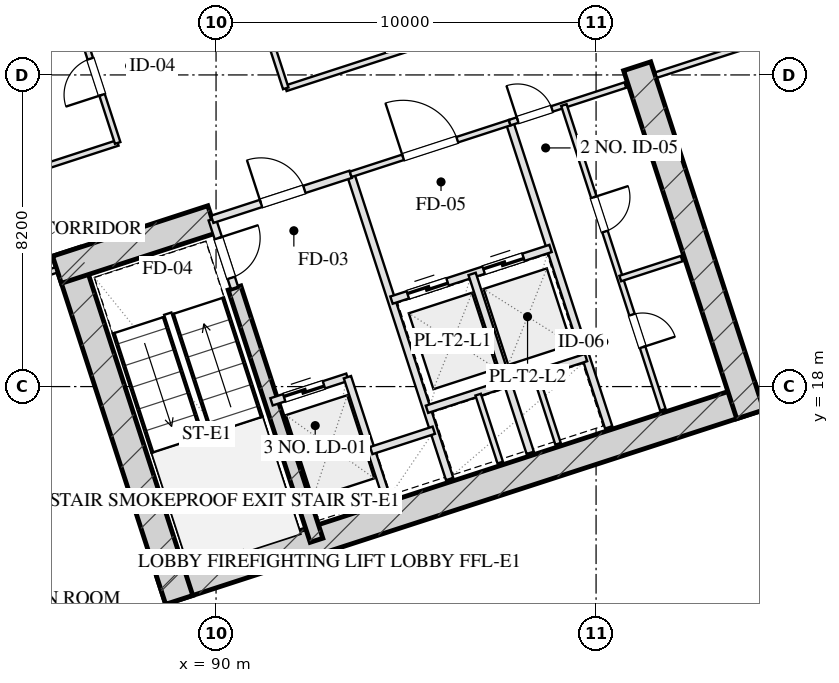
"""IFC4 building model, lengths in metres.
Left out: names, types, materials, properties, quantities, classifications, styles, units other than length and angle.
Written with IfcOpenShell. Run it as: python <this file> out.ifc"""

import sys

from ifc_helpers import new_model, si_unit, direction, frame, frame_2d, origin, place, context, subcontext, project, spatial, rectangle, extrude, element, fill, save


model = new_model("IFC4")
c1 = context("Model", 3, precision=1e-05, world=origin(), true_north=direction((0.0, 1.0)))
c2 = subcontext(c1, "Body", "Model", "MODEL_VIEW")
j1 = project(units=[si_unit("LENGTHUNIT", "METRE"), si_unit("PLANEANGLEUNIT", "RADIAN")], contexts=[c1])
p1 = place(None, origin())
s1 = spatial("IfcSite", under=j1, at=p1, CompositionType="ELEMENT")
p2 = place(p1, origin())
s2 = spatial("IfcBuilding", under=s1, at=p2, CompositionType="ELEMENT")
p3 = place(p2, frame((0.0, 0.0, 30.0)))
s3 = spatial("IfcBuildingStorey", under=s2, at=p3, CompositionType="ELEMENT", Elevation=30.0)
p4 = place(p3, frame((88.559, 12.629, 0.0), z_axis=(0.0, 0.0, 1.0), x_axis=(0.951056072937, 0.309018358888, 0.0)))
e1 = element("IfcWall", 1, at=p4, inside=s3, PredefinedType="SHEAR", context=c2, shape_type="SweptSolid", body=[
    extrude(rectangle(XDim=16.55, YDim=0.75, at=frame_2d((8.275, 0.0))), origin(), (0.0, 0.0, 1.0), 4.0),
])
p5 = place(p3, frame((86.055, 21.546, 0.0), z_axis=(0.0, 0.0, 1.0), x_axis=(0.309023585745, -0.951054374604, 0.0)))
e2 = element("IfcWall", 2, at=p5, inside=s3, PredefinedType="SHEAR", context=c2, shape_type="SweptSolid", body=[
    extrude(rectangle(XDim=9.63, YDim=0.75, at=frame_2d((4.815, 0.0))), origin(), (0.0, 0.0, 1.0), 4.0),
])
p6 = place(p3, frame((101.082, 26.429, 0.0), z_axis=(0.0, 0.0, 1.0), x_axis=(0.309016134813, -0.951056795583, 0.0)))
e3 = element("IfcWall", 3, at=p6, inside=s3, PredefinedType="SHEAR", context=c2, shape_type="SweptSolid", body=[
    extrude(rectangle(XDim=9.63, YDim=0.75, at=frame_2d((4.815, 0.0))), origin(), (0.0, 0.0, 1.0), 4.0),
])
p7 = place(p3, frame((90.486, 20.594, 0.0), z_axis=(0.0, 0.0, 1.0), x_axis=(0.309020428229, -0.951055400562, 0.0)))
e4 = element("IfcWall", 4, at=p7, inside=s3, PredefinedType="SHEAR", context=c2, shape_type="SweptSolid", body=[
    extrude(rectangle(XDim=6.98, YDim=0.35, at=frame_2d((3.49, 0.0))), origin(), (0.0, 0.0, 1.0), 4.0),
])
p8 = place(p3, frame((85.814, 21.074, 0.0), z_axis=(0.0, 0.0, 1.0), x_axis=(0.95106580992, 0.308988390074, 0.0)))
e5 = element("IfcWall", 5, at=p8, inside=s3, PredefinedType="SHEAR", context=c2, shape_type="SweptSolid", body=[
    extrude(rectangle(XDim=4.295, YDim=0.75, at=frame_2d((2.147, 0.0))), origin(), (0.0, 0.0, 1.0), 4.0),
])
p9 = place(p3, frame((100.345, 63.648, 0.0), z_axis=(0.0, 0.0, 1.0), x_axis=(0.309014526607, -0.951057318118, 0.0)))
e6 = element("IfcWall", 6, at=p9, inside=s3, PredefinedType="SOLIDWALL", context=c2, shape_type="SweptSolid", body=[
    extrude(rectangle(XDim=50.0, YDim=0.4, at=frame_2d((25.0, 0.0))), origin(), (0.0, 0.0, 1.0), 3.16),
])
p10 = place(p9, frame((30.15, 0.0, 0.75)))
e7 = element("IfcOpeningElement", 7, at=p10, cuts=e6, PredefinedType="OPENING", context=c2, shape_type="SweptSolid", body=[
    extrude(rectangle(XDim=2.5, YDim=1.75, at=frame_2d((1.25, 0.875))), frame((0.0, 0.21, 0.0), z_axis=(0.0, -1.0, 0.0), x_axis=(1.0, 0.0, 0.0)), (0.0, 0.0, 1.0), 0.42),
])
p11 = place(p9, frame((21.15, 0.0, 0.75)))
e8 = element("IfcOpeningElement", 8, at=p11, cuts=e6, PredefinedType="OPENING", context=c2, shape_type="SweptSolid", body=[
    extrude(rectangle(XDim=2.5, YDim=1.75, at=frame_2d((1.25, 0.875))), frame((0.0, 0.21, 0.0), z_axis=(0.0, -1.0, 0.0), x_axis=(1.0, 0.0, 0.0)), (0.0, 0.0, 1.0), 0.42),
])
p12 = place(p3, frame((113.998, 12.567, 0.0), z_axis=(0.0, 0.0, 1.0), x_axis=(-0.951055939317, -0.309018770125, 0.0)))
e9 = element("IfcWall", 9, at=p12, inside=s3, PredefinedType="SOLIDWALL", context=c2, shape_type="SweptSolid", body=[
    extrude(rectangle(XDim=32.4, YDim=0.4, at=frame_2d((16.2, 0.0))), origin(), (0.0, 0.0, 1.0), 3.16),
])
p13 = place(p3, frame((89.899, 22.401, 0.0), z_axis=(0.0, 0.0, 1.0), x_axis=(0.308932062672, -0.951084108086, 0.0)))
e10 = element("IfcWall", 10, at=p13, inside=s3, PredefinedType="PARTITIONING", context=c2, shape_type="SweptSolid", body=[
    extrude(rectangle(XDim=1.9, YDim=0.2, at=frame_2d((0.95, 0.0))), origin(), (0.0, 0.0, 1.0), 3.725),
])
p14 = place(p13, frame((0.52, 0.0, 0.0)))
e11 = element("IfcOpeningElement", 11, at=p14, cuts=e10, PredefinedType="OPENING", context=c2, shape_type="SweptSolid", body=[
    extrude(rectangle(XDim=1.1, YDim=2.05, at=frame_2d((0.55, 1.025))), frame((0.0, 0.11, 0.0), z_axis=(0.0, -1.0, 0.0), x_axis=(1.0, 0.0, 0.0)), (0.0, 0.0, 1.0), 0.22),
])
p15 = place(p3, frame((93.542, 23.585, 0.0), z_axis=(0.0, 0.0, 1.0), x_axis=(0.309042196757, -0.951048327176, 0.0)))
e12 = element("IfcWall", 12, at=p15, inside=s3, PredefinedType="PARTITIONING", context=c2, shape_type="SweptSolid", body=[
    extrude(rectangle(XDim=8.43, YDim=0.2, at=frame_2d((4.215, 0.0))), origin(), (0.0, 0.0, 1.0), 3.725),
])
p16 = place(p3, frame((89.899, 22.401, 0.0), z_axis=(0.0, 0.0, 1.0), x_axis=(0.951046716504, 0.309047153403, 0.0)))
e13 = element("IfcWall", 13, at=p16, inside=s3, PredefinedType="PARTITIONING", context=c2, shape_type="SweptSolid", body=[
    extrude(rectangle(XDim=3.83, YDim=0.2, at=frame_2d((1.915, 0.0))), origin(), (0.0, 0.0, 1.0), 3.725),
])
p17 = place(p16, frame((1.35, 0.0, 0.0)))
e14 = element("IfcOpeningElement", 14, at=p17, cuts=e13, PredefinedType="OPENING", context=c2, shape_type="SweptSolid", body=[
    extrude(rectangle(XDim=1.2, YDim=2.05, at=frame_2d((0.6, 1.025))), frame((0.0, 0.11, 0.0), z_axis=(0.0, -1.0, 0.0), x_axis=(1.0, 0.0, 0.0)), (0.0, 0.0, 1.0), 0.22),
])
p18 = place(p3, frame((91.46, 17.598, 0.0), z_axis=(0.0, 0.0, 1.0), x_axis=(0.951062257173, 0.308999325213, 0.0)))
e15 = element("IfcWall", 15, at=p18, inside=s3, PredefinedType="PARTITIONING", context=c2, shape_type="SweptSolid", body=[
    extrude(rectangle(XDim=2.1, YDim=0.2, at=frame_2d((1.05, 0.0))), origin(), (0.0, 0.0, 1.0), 3.725),
])
p19 = place(p18, frame((0.35, 0.0, 0.0)))
e16 = element("IfcOpeningElement", 16, at=p19, cuts=e15, PredefinedType="OPENING", context=c2, shape_type="SweptSolid", body=[
    extrude(rectangle(XDim=1.1, YDim=2.05, at=frame_2d((0.55, 1.025))), frame((0.0, 0.11, 0.0), z_axis=(0.0, -1.0, 0.0), x_axis=(1.0, 0.0, 0.0)), (0.0, 0.0, 1.0), 0.22),
])
p20 = place(p3, frame((93.457, 18.247, 0.0), z_axis=(0.0, 0.0, 1.0), x_axis=(0.3089935693, -0.951064127245, 0.0)))
e17 = element("IfcWall", 17, at=p20, inside=s3, PredefinedType="PARTITIONING", context=c2, shape_type="SweptSolid", body=[
    extrude(rectangle(XDim=3.7, YDim=0.2, at=frame_2d((1.85, 0.0))), origin(), (0.0, 0.0, 1.0), 3.725),
])
p21 = place(p3, frame((94.084, 16.317, 0.0), z_axis=(0.0, 0.0, 1.0), x_axis=(0.951041328149, 0.309063734775, 0.0)))
e18 = element("IfcWall", 18, at=p21, inside=s3, PredefinedType="PARTITIONING", context=c2, shape_type="SweptSolid", body=[
    extrude(rectangle(XDim=1.73, YDim=0.2, at=frame_2d((0.865, 0.0))), origin(), (0.0, 0.0, 1.0), 3.725),
])
p22 = place(p3, frame((97.727, 24.944, 0.0), z_axis=(0.0, 0.0, 1.0), x_axis=(0.309016001439, -0.951056838919, 0.0)))
e19 = element("IfcWall", 19, at=p22, inside=s3, PredefinedType="PARTITIONING", context=c2, shape_type="SweptSolid", body=[
    extrude(rectangle(XDim=8.43, YDim=0.2, at=frame_2d((4.215, 0.0))), origin(), (0.0, 0.0, 1.0), 3.725),
])
p23 = place(p3, frame((93.542, 23.585, 0.0), z_axis=(0.0, 0.0, 1.0), x_axis=(0.951063829732, 0.308994485023, 0.0)))
e20 = element("IfcWall", 20, at=p23, inside=s3, PredefinedType="PARTITIONING", context=c2, shape_type="SweptSolid", body=[
    extrude(rectangle(XDim=4.4, YDim=0.15, at=frame_2d((2.2, 0.0))), origin(), (0.0, 0.0, 1.0), 3.725),
])
p24 = place(p23, frame((1.45, 0.0, 0.0)))
e21 = element("IfcOpeningElement", 21, at=p24, cuts=e20, PredefinedType="OPENING", context=c2, shape_type="SweptSolid", body=[
    extrude(rectangle(XDim=1.5, YDim=2.05, at=frame_2d((0.75, 1.025))), frame((0.0, 0.085, 0.0), z_axis=(0.0, -1.0, 0.0), x_axis=(1.0, 0.0, 0.0)), (0.0, 0.0, 1.0), 0.17),
])
p25 = place(p3, frame((94.617, 20.275, 0.0), z_axis=(0.0, 0.0, 1.0), x_axis=(0.951058531764, 0.30901079133, 0.0)))
e22 = element("IfcWall", 22, at=p25, inside=s3, PredefinedType="PARTITIONING", context=c2, shape_type="SweptSolid", body=[
    extrude(rectangle(XDim=4.4, YDim=0.2, at=frame_2d((2.2, 0.0))), origin(), (0.0, 0.0, 1.0), 3.725),
])
p26 = place(p25, frame((0.45, 0.0, 0.0)))
e23 = element("IfcOpeningElement", 23, at=p26, cuts=e22, PredefinedType="OPENING", context=c2, shape_type="SweptSolid", body=[
    extrude(rectangle(XDim=1.1, YDim=2.05, at=frame_2d((0.55, 1.025))), frame((0.0, 0.11, 0.0), z_axis=(0.0, -1.0, 0.0), x_axis=(1.0, 0.0, 0.0)), (0.0, 0.0, 1.0), 0.22),
])
p27 = place(p25, frame((2.55, 0.0, 0.0)))
e24 = element("IfcOpeningElement", 24, at=p27, cuts=e22, PredefinedType="OPENING", context=c2, shape_type="SweptSolid", body=[
    extrude(rectangle(XDim=1.1, YDim=2.05, at=frame_2d((0.55, 1.025))), frame((0.0, 0.11, 0.0), z_axis=(0.0, -1.0, 0.0), x_axis=(1.0, 0.0, 0.0)), (0.0, 0.0, 1.0), 0.22),
])
p28 = place(p3, frame((96.738, 20.964, 0.0), z_axis=(0.0, 0.0, 1.0), x_axis=(0.309042578481, -0.951048203135, 0.0)))
e25 = element("IfcWall", 25, at=p28, inside=s3, PredefinedType="PARTITIONING", context=c2, shape_type="SweptSolid", body=[
    extrude(rectangle(XDim=4.95, YDim=0.2, at=frame_2d((2.475, 0.0))), origin(), (0.0, 0.0, 1.0), 3.725),
])
p29 = place(p3, frame((95.551, 17.403, 0.0), z_axis=(0.0, 0.0, 1.0), x_axis=(0.951058531764, 0.30901079133, 0.0)))
e26 = element("IfcWall", 26, at=p29, inside=s3, PredefinedType="PARTITIONING", context=c2, shape_type="SweptSolid", body=[
    extrude(rectangle(XDim=4.4, YDim=0.2, at=frame_2d((2.2, 0.0))), origin(), (0.0, 0.0, 1.0), 3.725),
])
p30 = place(p3, frame((96.897, 17.788, 0.0), z_axis=(0.0, 0.0, 1.0), x_axis=(0.30897153969, -0.951071284217, 0.0)))
e27 = element("IfcWall", 27, at=p30, inside=s3, PredefinedType="PARTITIONING", context=c2, shape_type="SweptSolid", body=[
    extrude(rectangle(XDim=1.88, YDim=0.15, at=frame_2d((0.94, 0.0))), origin(), (0.0, 0.0, 1.0), 3.725),
])
p31 = place(p3, frame((98.419, 18.282, 0.0), z_axis=(0.0, 0.0, 1.0), x_axis=(0.308933380006, -0.951083680187, 0.0)))
e28 = element("IfcWall", 28, at=p31, inside=s3, PredefinedType="PARTITIONING", context=c2, shape_type="SweptSolid", body=[
    extrude(rectangle(XDim=1.88, YDim=0.15, at=frame_2d((0.94, 0.0))), origin(), (0.0, 0.0, 1.0), 3.725),
])
p32 = place(p3, frame((97.727, 24.944, 0.0), z_axis=(0.0, 0.0, 1.0), x_axis=(0.951036872128, 0.309077446369, 0.0)))
e29 = element("IfcWall", 29, at=p32, inside=s3, PredefinedType="PARTITIONING", context=c2, shape_type="SweptSolid", body=[
    extrude(rectangle(XDim=3.2, YDim=0.15, at=frame_2d((1.6, 0.0))), origin(), (0.0, 0.0, 1.0), 3.725),
])
p33 = place(p32, frame((0.22, 0.0, 0.0)))
e30 = element("IfcOpeningElement", 30, at=p33, cuts=e29, PredefinedType="OPENING", context=c2, shape_type="SweptSolid", body=[
    extrude(rectangle(XDim=0.95, YDim=2.05, at=frame_2d((0.475, 1.025))), frame((0.0, 0.085, 0.0), z_axis=(0.0, -1.0, 0.0), x_axis=(1.0, 0.0, 0.0)), (0.0, 0.0, 1.0), 0.17),
])
p34 = place(p3, frame((99.153, 25.408, 0.0), z_axis=(0.0, 0.0, 1.0), x_axis=(0.309016001439, -0.951056838919, 0.0)))
e31 = element("IfcWall", 31, at=p34, inside=s3, PredefinedType="PARTITIONING", context=c2, shape_type="SweptSolid", body=[
    extrude(rectangle(XDim=8.43, YDim=0.15, at=frame_2d((4.215, 0.0))), origin(), (0.0, 0.0, 1.0), 3.725),
])
p35 = place(p34, frame((2.55, 0.0, 0.0)))
e32 = element("IfcOpeningElement", 32, at=p35, cuts=e31, PredefinedType="OPENING", context=c2, shape_type="SweptSolid", body=[
    extrude(rectangle(XDim=0.95, YDim=2.05, at=frame_2d((0.475, 1.025))), frame((0.0, 0.085, 0.0), z_axis=(0.0, -1.0, 0.0), x_axis=(1.0, 0.0, 0.0)), (0.0, 0.0, 1.0), 0.17),
])
p36 = place(p34, frame((5.8, 0.0, 0.0)))
e33 = element("IfcOpeningElement", 33, at=p36, cuts=e31, PredefinedType="OPENING", context=c2, shape_type="SweptSolid", body=[
    extrude(rectangle(XDim=0.9, YDim=2.05, at=frame_2d((0.45, 1.025))), frame((0.0, 0.085, 0.0), z_axis=(0.0, -1.0, 0.0), x_axis=(1.0, 0.0, 0.0)), (0.0, 0.0, 1.0), 0.17),
])
p37 = place(p3, frame((100.636, 20.843, 0.0), z_axis=(0.0, 0.0, 1.0), x_axis=(0.951040401051, 0.309066587596, 0.0)))
e34 = element("IfcWall", 34, at=p37, inside=s3, PredefinedType="PARTITIONING", context=c2, shape_type="SweptSolid", body=[
    extrude(rectangle(XDim=1.7, YDim=0.15, at=frame_2d((0.85, 0.0))), origin(), (0.0, 0.0, 1.0), 3.725),
])
p38 = place(p3, frame((75.519, 17.729, 0.0), z_axis=(0.0, 0.0, 1.0), x_axis=(0.951056658866, 0.309016555588, 0.0)))
e35 = element("IfcWall", 35, at=p38, inside=s3, PredefinedType="PARTITIONING", context=c2, shape_type="SweptSolid", body=[
    extrude(rectangle(XDim=10.8, YDim=0.15, at=frame_2d((5.4, 0.0))), origin(), (0.0, 0.0, 1.0), 3.725),
])
p39 = place(p38, frame((4.536, 0.0, 0.0)))
e36 = element("IfcOpeningElement", 36, at=p39, cuts=e35, PredefinedType="OPENING", context=c2, shape_type="SweptSolid", body=[
    extrude(rectangle(XDim=1.0, YDim=2.05, at=frame_2d((0.5, 1.025))), frame((0.0, 0.085, 0.0), z_axis=(0.0, -1.0, 0.0), x_axis=(1.0, 0.0, 0.0)), (0.0, 0.0, 1.0), 0.17),
])
p40 = place(p3, frame((101.578, 26.196, 0.0), z_axis=(0.0, 0.0, 1.0), x_axis=(0.951059043131, 0.309009217467, 0.0)))
e37 = element("IfcWall", 37, at=p40, inside=s3, PredefinedType="PARTITIONING", context=c2, shape_type="SweptSolid", body=[
    extrude(rectangle(XDim=10.2, YDim=0.15, at=frame_2d((5.1, 0.0))), origin(), (0.0, 0.0, 1.0), 3.725),
])
p41 = place(p40, frame((4.284, 0.0, 0.0)))
e38 = element("IfcOpeningElement", 38, at=p41, cuts=e37, PredefinedType="OPENING", context=c2, shape_type="SweptSolid", body=[
    extrude(rectangle(XDim=1.0, YDim=2.05, at=frame_2d((0.5, 1.025))), frame((0.0, 0.085, 0.0), z_axis=(0.0, -1.0, 0.0), x_axis=(1.0, 0.0, 0.0)), (0.0, 0.0, 1.0), 0.17),
])
p42 = place(p3, frame((74.691, 20.278, 0.0), z_axis=(0.0, 0.0, 1.0), x_axis=(0.951052712421, 0.309028701251, 0.0)))
e39 = element("IfcWall", 39, at=p42, inside=s3, PredefinedType="PARTITIONING", context=c2, shape_type="SweptSolid", body=[
    extrude(rectangle(XDim=13.375, YDim=0.15, at=frame_2d((6.688, 0.0))), origin(), (0.0, 0.0, 1.0), 3.725),
])
p43 = place(p3, frame((91.834, 25.848, 0.0), z_axis=(0.0, 0.0, 1.0), x_axis=(0.951055605195, 0.309019798438, 0.0)))
e40 = element("IfcWall", 40, at=p43, inside=s3, PredefinedType="PARTITIONING", context=c2, shape_type="SweptSolid", body=[
    extrude(rectangle(XDim=19.575, YDim=0.15, at=frame_2d((9.788, 0.0))), origin(), (0.0, 0.0, 1.0), 3.725),
])
p44 = place(p3, frame((87.412, 24.411, 0.0), z_axis=(0.0, 0.0, 1.0), x_axis=(-0.309022042254, 0.951054876125, 0.0)))
e41 = element("IfcWall", 41, at=p44, inside=s3, PredefinedType="PARTITIONING", context=c2, shape_type="SweptSolid", body=[
    extrude(rectangle(XDim=16.64, YDim=0.15, at=frame_2d((8.32, 0.0))), origin(), (0.0, 0.0, 1.0), 3.725),
])
p45 = place(p44, frame((1.33, 0.0, 0.0)))
e42 = element("IfcOpeningElement", 42, at=p45, cuts=e41, PredefinedType="OPENING", context=c2, shape_type="SweptSolid", body=[
    extrude(rectangle(XDim=1.0, YDim=2.05, at=frame_2d((0.5, 1.025))), frame((0.0, 0.085, 0.0), z_axis=(0.0, -1.0, 0.0), x_axis=(1.0, 0.0, 0.0)), (0.0, 0.0, 1.0), 0.17),
])
p46 = place(p44, frame((5.83, 0.0, 0.0)))
e43 = element("IfcOpeningElement", 43, at=p46, cuts=e41, PredefinedType="OPENING", context=c2, shape_type="SweptSolid", body=[
    extrude(rectangle(XDim=1.0, YDim=2.05, at=frame_2d((0.5, 1.025))), frame((0.0, 0.085, 0.0), z_axis=(0.0, -1.0, 0.0), x_axis=(1.0, 0.0, 0.0)), (0.0, 0.0, 1.0), 0.17),
])
p47 = place(p44, frame((10.49, 0.0, 0.0)))
e44 = element("IfcOpeningElement", 44, at=p47, cuts=e41, PredefinedType="OPENING", context=c2, shape_type="SweptSolid", body=[
    extrude(rectangle(XDim=1.05, YDim=2.05, at=frame_2d((0.525, 1.025))), frame((0.0, 0.085, 0.0), z_axis=(0.0, -1.0, 0.0), x_axis=(1.0, 0.0, 0.0)), (0.0, 0.0, 1.0), 0.17),
])
p48 = place(p44, frame((14.31, 0.0, 0.0)))
e45 = element("IfcOpeningElement", 45, at=p48, cuts=e41, PredefinedType="OPENING", context=c2, shape_type="SweptSolid", body=[
    extrude(rectangle(XDim=1.0, YDim=2.05, at=frame_2d((0.5, 1.025))), frame((0.0, 0.085, 0.0), z_axis=(0.0, -1.0, 0.0), x_axis=(1.0, 0.0, 0.0)), (0.0, 0.0, 1.0), 0.17),
])
p49 = place(p3, frame((91.834, 25.848, 0.0), z_axis=(0.0, 0.0, 1.0), x_axis=(-0.30901773025, 0.951056277195, 0.0)))
e46 = element("IfcWall", 46, at=p49, inside=s3, PredefinedType="PARTITIONING", context=c2, shape_type="SweptSolid", body=[
    extrude(rectangle(XDim=16.64, YDim=0.15, at=frame_2d((8.32, 0.0))), origin(), (0.0, 0.0, 1.0), 3.725),
])
p50 = place(p49, frame((1.663, 0.0, 0.0)))
e47 = element("IfcOpeningElement", 47, at=p50, cuts=e46, PredefinedType="OPENING", context=c2, shape_type="SweptSolid", body=[
    extrude(rectangle(XDim=1.0, YDim=2.05, at=frame_2d((0.5, 1.025))), frame((0.0, 0.085, 0.0), z_axis=(0.0, -1.0, 0.0), x_axis=(1.0, 0.0, 0.0)), (0.0, 0.0, 1.0), 0.17),
])
p51 = place(p49, frame((6.156, 0.0, 0.0)))
e48 = element("IfcOpeningElement", 48, at=p51, cuts=e46, PredefinedType="OPENING", context=c2, shape_type="SweptSolid", body=[
    extrude(rectangle(XDim=1.0, YDim=2.05, at=frame_2d((0.5, 1.025))), frame((0.0, 0.085, 0.0), z_axis=(0.0, -1.0, 0.0), x_axis=(1.0, 0.0, 0.0)), (0.0, 0.0, 1.0), 0.17),
])
p52 = place(p49, frame((10.649, 0.0, 0.0)))
e49 = element("IfcOpeningElement", 49, at=p52, cuts=e46, PredefinedType="OPENING", context=c2, shape_type="SweptSolid", body=[
    extrude(rectangle(XDim=1.0, YDim=2.05, at=frame_2d((0.5, 1.025))), frame((0.0, 0.085, 0.0), z_axis=(0.0, -1.0, 0.0), x_axis=(1.0, 0.0, 0.0)), (0.0, 0.0, 1.0), 0.17),
])
p53 = place(p49, frame((14.476, 0.0, 0.0)))
e50 = element("IfcOpeningElement", 50, at=p53, cuts=e46, PredefinedType="OPENING", context=c2, shape_type="SweptSolid", body=[
    extrude(rectangle(XDim=1.0, YDim=2.05, at=frame_2d((0.5, 1.025))), frame((0.0, 0.085, 0.0), z_axis=(0.0, -1.0, 0.0), x_axis=(1.0, 0.0, 0.0)), (0.0, 0.0, 1.0), 0.17),
])
p54 = place(p3, frame((73.56, 23.759, 0.0), z_axis=(0.0, 0.0, 1.0), x_axis=(0.951058077006, 0.309012190961, 0.0)))
e51 = element("IfcWall", 51, at=p54, inside=s3, PredefinedType="PARTITIONING", context=c2, shape_type="SweptSolid", body=[
    extrude(rectangle(XDim=13.375, YDim=0.15, at=frame_2d((6.688, 0.0))), origin(), (0.0, 0.0, 1.0), 3.725),
])
p55 = place(p14, origin())
e52 = element("IfcDoor", 52, at=p55, inside=s3, OperationType="SINGLE_SWING_LEFT", PredefinedType="DOOR", context=c2, shape_type="SweptSolid", body=[
    extrude(rectangle(XDim=1.1, YDim=2.05, at=frame_2d((0.55, 1.025))), frame((0.0, 0.025, 0.0), z_axis=(0.0, -1.0, 0.0), x_axis=(1.0, 0.0, 0.0)), (0.0, 0.0, 1.0), 0.05),
])
fill(e11, e52)
p56 = place(p17, origin())
e53 = element("IfcDoor", 53, at=p56, inside=s3, OperationType="SINGLE_SWING_LEFT", PredefinedType="DOOR", context=c2, shape_type="SweptSolid", body=[
    extrude(rectangle(XDim=1.2, YDim=2.05, at=frame_2d((0.6, 1.025))), frame((0.0, 0.025, 0.0), z_axis=(0.0, -1.0, 0.0), x_axis=(1.0, 0.0, 0.0)), (0.0, 0.0, 1.0), 0.05),
])
fill(e14, e53)
p57 = place(p19, origin())
e54 = element("IfcDoor", 54, at=p57, inside=s3, OperationType="DOUBLE_DOOR_SLIDING", PredefinedType="DOOR", context=c2, shape_type="SweptSolid", body=[
    extrude(rectangle(XDim=1.1, YDim=2.05, at=frame_2d((0.55, 1.025))), frame((0.0, 0.025, 0.0), z_axis=(0.0, -1.0, 0.0), x_axis=(1.0, 0.0, 0.0)), (0.0, 0.0, 1.0), 0.05),
])
fill(e16, e54)
p58 = place(p24, origin())
e55 = element("IfcDoor", 55, at=p58, inside=s3, OperationType="SINGLE_SWING_LEFT", PredefinedType="DOOR", context=c2, shape_type="SweptSolid", body=[
    extrude(rectangle(XDim=1.5, YDim=2.05, at=frame_2d((0.75, 1.025))), frame((0.0, 0.025, 0.0), z_axis=(0.0, -1.0, 0.0), x_axis=(1.0, 0.0, 0.0)), (0.0, 0.0, 1.0), 0.05),
])
fill(e21, e55)
p59 = place(p26, origin())
e56 = element("IfcDoor", 56, at=p59, inside=s3, OperationType="DOUBLE_DOOR_SLIDING", PredefinedType="DOOR", context=c2, shape_type="SweptSolid", body=[
    extrude(rectangle(XDim=1.1, YDim=2.05, at=frame_2d((0.55, 1.025))), frame((0.0, 0.025, 0.0), z_axis=(0.0, -1.0, 0.0), x_axis=(1.0, 0.0, 0.0)), (0.0, 0.0, 1.0), 0.05),
])
fill(e23, e56)
p60 = place(p27, origin())
e57 = element("IfcDoor", 57, at=p60, inside=s3, OperationType="DOUBLE_DOOR_SLIDING", PredefinedType="DOOR", context=c2, shape_type="SweptSolid", body=[
    extrude(rectangle(XDim=1.1, YDim=2.05, at=frame_2d((0.55, 1.025))), frame((0.0, 0.025, 0.0), z_axis=(0.0, -1.0, 0.0), x_axis=(1.0, 0.0, 0.0)), (0.0, 0.0, 1.0), 0.05),
])
fill(e24, e57)
p61 = place(p33, origin())
e58 = element("IfcDoor", 58, at=p61, inside=s3, OperationType="SINGLE_SWING_LEFT", PredefinedType="DOOR", context=c2, shape_type="SweptSolid", body=[
    extrude(rectangle(XDim=0.95, YDim=2.05, at=frame_2d((0.475, 1.025))), frame((0.0, 0.025, 0.0), z_axis=(0.0, -1.0, 0.0), x_axis=(1.0, 0.0, 0.0)), (0.0, 0.0, 1.0), 0.05),
])
fill(e30, e58)
p62 = place(p35, origin())
e59 = element("IfcDoor", 59, at=p62, inside=s3, OperationType="SINGLE_SWING_LEFT", PredefinedType="DOOR", context=c2, shape_type="SweptSolid", body=[
    extrude(rectangle(XDim=0.95, YDim=2.05, at=frame_2d((0.475, 1.025))), frame((0.0, 0.025, 0.0), z_axis=(0.0, -1.0, 0.0), x_axis=(1.0, 0.0, 0.0)), (0.0, 0.0, 1.0), 0.05),
])
fill(e32, e59)
p63 = place(p36, origin())
e60 = element("IfcDoor", 60, at=p63, inside=s3, OperationType="SINGLE_SWING_RIGHT", PredefinedType="DOOR", context=c2, shape_type="SweptSolid", body=[
    extrude(rectangle(XDim=0.9, YDim=2.05, at=frame_2d((0.45, 1.025))), frame((0.0, 0.025, 0.0), z_axis=(0.0, -1.0, 0.0), x_axis=(1.0, 0.0, 0.0)), (0.0, 0.0, 1.0), 0.05),
])
fill(e33, e60)
p64 = place(p45, origin())
e61 = element("IfcDoor", 61, at=p64, inside=s3, OperationType="SINGLE_SWING_LEFT", PredefinedType="DOOR", context=c2, shape_type="SweptSolid", body=[
    extrude(rectangle(XDim=1.0, YDim=2.05, at=frame_2d((0.5, 1.025))), frame((0.0, 0.025, 0.0), z_axis=(0.0, -1.0, 0.0), x_axis=(1.0, 0.0, 0.0)), (0.0, 0.0, 1.0), 0.05),
])
fill(e42, e61)
save(model, sys.argv[1])
